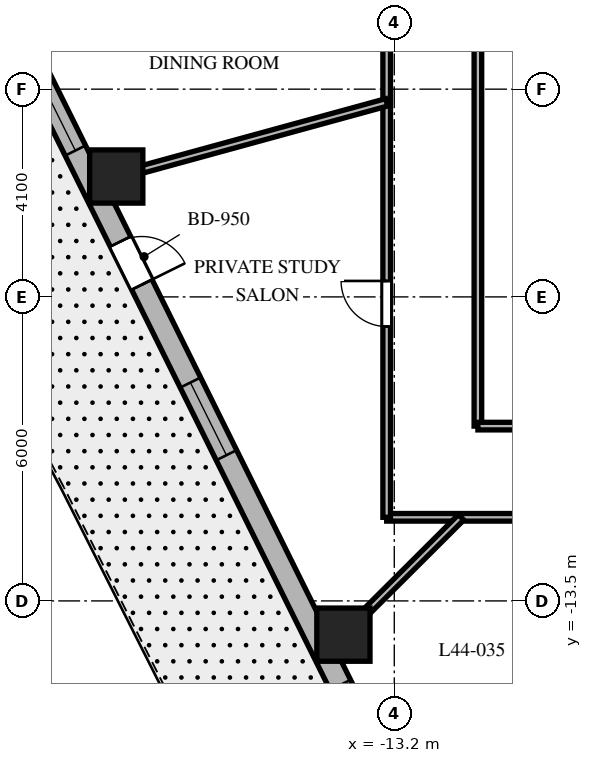
"""IFC4 building model, lengths in metres.
Left out: names, types, materials, properties, quantities, classifications, styles, units other than length and angle.
Written with IfcOpenShell. Run it as: python <this file> out.ifc"""

import sys

from ifc_helpers import new_model, si_unit, direction, frame, frame_2d, origin, origin_2d, place, context, subcontext, project, spatial, rectangle, extrude, element, fill, save


model = new_model("IFC4")
c1 = context("Model", 3, precision=1e-05, world=origin(), true_north=direction((0.0, 1.0)))
c2 = subcontext(c1, "Body", "Model", "MODEL_VIEW")
j1 = project(units=[si_unit("LENGTHUNIT", "METRE"), si_unit("PLANEANGLEUNIT", "RADIAN")], contexts=[c1])
p1 = place(None, origin())
s1 = spatial("IfcSite", under=j1, at=p1, CompositionType="ELEMENT")
p2 = place(p1, origin())
s2 = spatial("IfcBuilding", under=s1, at=p2, CompositionType="ELEMENT")
p3 = place(p2, frame((0.0, 0.0, 179.3)))
s3 = spatial("IfcBuildingStorey", under=s2, at=p3, CompositionType="ELEMENT", Elevation=179.3)
for number, where, z_axis, x_axis in (
    (1, (-18.687, -5.124, 0.0), (0.0, 0.0, 1.0), (1.0, 0.0, 0.0)),
    (2, (-14.204, -14.166, 0.0), (0.0, 0.0, 1.0), (1.0, 0.0, 0.0)),
):
    element("IfcColumn", number, at=place(p3, frame(where, z_axis=z_axis, x_axis=x_axis)), inside=s3, PredefinedType="COLUMN", context=c2, shape_type="SweptSolid", body=[
        extrude(rectangle(XDim=1.05, YDim=1.05, at=origin_2d()), origin(), (0.0, 0.0, 1.0), 3.7),
    ])
p4 = place(p3, frame((-20.618, -2.344, 0.0), z_axis=(0.0, 0.0, 1.0), x_axis=(0.444243691097, -0.895905990002, 0.0)))
e3 = element("IfcWall", 3, at=p4, inside=s3, PredefinedType="SOLIDWALL", context=c2, shape_type="SweptSolid", body=[
    extrude(rectangle(XDim=16.784, YDim=0.45, at=frame_2d((8.392, 0.0))), origin(), (0.0, 0.0, 1.0), 3.4),
])
p5 = place(p4, frame((4.535, 0.0, 0.0)))
e4 = element("IfcOpeningElement", 4, at=p5, cuts=e3, PredefinedType="OPENING", context=c2, shape_type="SweptSolid", body=[
    extrude(rectangle(XDim=0.95, YDim=2.15, at=frame_2d((0.475, 1.075))), frame((0.0, 0.235, 0.0), z_axis=(0.0, -1.0, 0.0), x_axis=(1.0, 0.0, 0.0)), (0.0, 0.0, 1.0), 0.47),
])
p6 = place(p4, frame((0.931, 0.0, 0.8)))
e5 = element("IfcOpeningElement", 5, at=p6, cuts=e3, PredefinedType="OPENING", context=c2, shape_type="SweptSolid", body=[
    extrude(rectangle(XDim=1.6, YDim=1.75, at=frame_2d((0.8, 0.875))), frame((0.0, 0.235, 0.0), z_axis=(0.0, -1.0, 0.0), x_axis=(1.0, 0.0, 0.0)), (0.0, 0.0, 1.0), 0.47),
])
p7 = place(p4, frame((7.642, 0.0, 0.8)))
e6 = element("IfcOpeningElement", 6, at=p7, cuts=e3, PredefinedType="OPENING", context=c2, shape_type="SweptSolid", body=[
    extrude(rectangle(XDim=1.6, YDim=1.75, at=frame_2d((0.8, 0.875))), frame((0.0, 0.235, 0.0), z_axis=(0.0, -1.0, 0.0), x_axis=(1.0, 0.0, 0.0)), (0.0, 0.0, 1.0), 0.47),
])
p8 = place(p4, frame((14.303, 0.0, 0.8)))
e7 = element("IfcOpeningElement", 7, at=p8, cuts=e3, PredefinedType="OPENING", context=c2, shape_type="SweptSolid", body=[
    extrude(rectangle(XDim=1.6, YDim=1.75, at=frame_2d((0.8, 0.875))), frame((0.0, 0.235, 0.0), z_axis=(0.0, -1.0, 0.0), x_axis=(1.0, 0.0, 0.0)), (0.0, 0.0, 1.0), 0.47),
])
p9 = place(p3, frame((13.35, -11.85, 0.0), z_axis=(0.0, 0.0, 1.0), x_axis=(-1.0, 0.0, 0.0)))
e8 = element("IfcWall", 8, at=p9, inside=s3, PredefinedType="PARTITIONING", context=c2, shape_type="SweptSolid", body=[
    extrude(rectangle(XDim=26.7, YDim=0.15, at=frame_2d((13.35, 0.0))), origin(), (0.0, 0.0, 1.0), 2.84),
])
p10 = place(p9, frame((22.7, 0.0, 0.0)))
e9 = element("IfcOpeningElement", 9, at=p10, cuts=e8, PredefinedType="OPENING", context=c2, shape_type="SweptSolid", body=[
    extrude(rectangle(XDim=0.9, YDim=2.03, at=frame_2d((0.45, 1.015))), frame((0.0, 0.085, 0.0), z_axis=(0.0, -1.0, 0.0), x_axis=(1.0, 0.0, 0.0)), (0.0, 0.0, 1.0), 0.17),
])
p11 = place(p9, frame((18.523, 0.0, 0.0)))
e10 = element("IfcOpeningElement", 10, at=p11, cuts=e8, PredefinedType="OPENING", context=c2, shape_type="SweptSolid", body=[
    extrude(rectangle(XDim=0.95, YDim=2.03, at=frame_2d((0.475, 1.015))), frame((0.0, 0.085, 0.0), z_axis=(0.0, -1.0, 0.0), x_axis=(1.0, 0.0, 0.0)), (0.0, 0.0, 1.0), 0.17),
])
p12 = place(p9, frame((14.469, 0.0, 0.0)))
e11 = element("IfcOpeningElement", 11, at=p12, cuts=e8, PredefinedType="OPENING", context=c2, shape_type="SweptSolid", body=[
    extrude(rectangle(XDim=0.95, YDim=2.03, at=frame_2d((0.475, 1.015))), frame((0.0, 0.085, 0.0), z_axis=(0.0, -1.0, 0.0), x_axis=(1.0, 0.0, 0.0)), (0.0, 0.0, 1.0), 0.17),
])
p13 = place(p9, frame((10.314, 0.0, 0.0)))
e12 = element("IfcOpeningElement", 12, at=p13, cuts=e8, PredefinedType="OPENING", context=c2, shape_type="SweptSolid", body=[
    extrude(rectangle(XDim=0.95, YDim=2.03, at=frame_2d((0.475, 1.015))), frame((0.0, 0.085, 0.0), z_axis=(0.0, -1.0, 0.0), x_axis=(1.0, 0.0, 0.0)), (0.0, 0.0, 1.0), 0.17),
])
p14 = place(p9, frame((3.995, 0.0, 0.0)))
e13 = element("IfcOpeningElement", 13, at=p14, cuts=e8, PredefinedType="OPENING", context=c2, shape_type="SweptSolid", body=[
    extrude(rectangle(XDim=0.95, YDim=2.03, at=frame_2d((0.475, 1.015))), frame((0.0, 0.085, 0.0), z_axis=(0.0, -1.0, 0.0), x_axis=(1.0, 0.0, 0.0)), (0.0, 0.0, 1.0), 0.17),
])
p15 = place(p3, frame((-13.35, -11.85, 0.0), z_axis=(0.0, 0.0, 1.0), x_axis=(0.0, 1.0, 0.0)))
e14 = element("IfcWall", 14, at=p15, inside=s3, PredefinedType="PARTITIONING", context=c2, shape_type="SweptSolid", body=[
    extrude(rectangle(XDim=23.7, YDim=0.15, at=frame_2d((11.85, 0.0))), origin(), (0.0, 0.0, 1.0), 2.84),
])
p16 = place(p15, frame((18.389, 0.0, 0.0)))
e15 = element("IfcOpeningElement", 15, at=p16, cuts=e14, PredefinedType="OPENING", context=c2, shape_type="SweptSolid", body=[
    extrude(rectangle(XDim=0.95, YDim=2.03, at=frame_2d((0.475, 1.015))), frame((0.0, 0.085, 0.0), z_axis=(0.0, -1.0, 0.0), x_axis=(1.0, 0.0, 0.0)), (0.0, 0.0, 1.0), 0.17),
])
p17 = place(p15, frame((12.315, 0.0, 0.0)))
e16 = element("IfcOpeningElement", 16, at=p17, cuts=e14, PredefinedType="OPENING", context=c2, shape_type="SweptSolid", body=[
    extrude(rectangle(XDim=0.9, YDim=2.03, at=frame_2d((0.45, 1.015))), frame((0.0, 0.085, 0.0), z_axis=(0.0, -1.0, 0.0), x_axis=(1.0, 0.0, 0.0)), (0.0, 0.0, 1.0), 0.17),
])
p18 = place(p15, frame((9.27, 0.0, 0.0)))
e17 = element("IfcOpeningElement", 17, at=p18, cuts=e14, PredefinedType="OPENING", context=c2, shape_type="SweptSolid", body=[
    extrude(rectangle(XDim=0.9, YDim=2.03, at=frame_2d((0.45, 1.015))), frame((0.0, 0.085, 0.0), z_axis=(0.0, -1.0, 0.0), x_axis=(1.0, 0.0, 0.0)), (0.0, 0.0, 1.0), 0.17),
])
p19 = place(p15, frame((3.765, 0.0, 0.0)))
e18 = element("IfcOpeningElement", 18, at=p19, cuts=e14, PredefinedType="OPENING", context=c2, shape_type="SweptSolid", body=[
    extrude(rectangle(XDim=0.9, YDim=2.03, at=frame_2d((0.45, 1.015))), frame((0.0, 0.085, 0.0), z_axis=(0.0, -1.0, 0.0), x_axis=(1.0, 0.0, 0.0)), (0.0, 0.0, 1.0), 0.17),
])
p20 = place(p3, frame((-11.55, 2.7, 0.0), z_axis=(0.0, 0.0, 1.0), x_axis=(0.0, -1.0, 0.0)))
e19 = element("IfcWall", 19, at=p20, inside=s3, PredefinedType="PARTITIONING", context=c2, shape_type="SweptSolid", body=[
    extrude(rectangle(XDim=12.75, YDim=0.15, at=frame_2d((6.375, 0.0))), origin(), (0.0, 0.0, 1.0), 2.84),
])
p21 = place(p3, frame((-11.55, -10.05, 0.0), z_axis=(0.0, 0.0, 1.0), x_axis=(1.0, 0.0, 0.0)))
e20 = element("IfcWall", 20, at=p21, inside=s3, PredefinedType="PARTITIONING", context=c2, shape_type="SweptSolid", body=[
    extrude(rectangle(XDim=11.55, YDim=0.15, at=frame_2d((5.775, 0.0))), origin(), (0.0, 0.0, 1.0), 2.84),
])
p22 = place(p3, frame((-13.35, -3.661, 0.0), z_axis=(0.0, 0.0, 1.0), x_axis=(-0.964397145454, -0.264458211898, 0.0)))
e21 = element("IfcWall", 21, at=p22, inside=s3, PredefinedType="PARTITIONING", context=c2, shape_type="SweptSolid", body=[
    extrude(rectangle(XDim=6.039, YDim=0.15, at=frame_2d((3.019, 0.0))), origin(), (0.0, 0.0, 1.0), 2.64),
])
p23 = place(p3, frame((-11.882, -11.85, 0.0), z_axis=(0.0, 0.0, 1.0), x_axis=(-0.708037373639, -0.706174962407, 0.0)))
e22 = element("IfcWall", 22, at=p23, inside=s3, PredefinedType="PARTITIONING", context=c2, shape_type="SweptSolid", body=[
    extrude(rectangle(XDim=3.802, YDim=0.15, at=frame_2d((1.901, 0.0))), origin(), (0.0, 0.0, 1.0), 2.64),
])
p24 = place(p3, frame((-7.619, -11.85, 0.0), z_axis=(0.0, 0.0, 1.0), x_axis=(-0.540829263478, -0.841132396098, 0.0)))
e23 = element("IfcWall", 23, at=p24, inside=s3, PredefinedType="PARTITIONING", context=c2, shape_type="SweptSolid", body=[
    extrude(rectangle(XDim=7.919, YDim=0.15, at=frame_2d((3.959, 0.0))), origin(), (0.0, 0.0, 1.0), 2.64),
])
p25 = place(p5, origin())
e24 = element("IfcDoor", 24, at=p25, inside=s3, OperationType="SINGLE_SWING_RIGHT", PredefinedType="DOOR", context=c2, shape_type="SweptSolid", body=[
    extrude(rectangle(XDim=0.95, YDim=2.15, at=frame_2d((0.475, 1.075))), frame((0.0, 0.025, 0.0), z_axis=(0.0, -1.0, 0.0), x_axis=(1.0, 0.0, 0.0)), (0.0, 0.0, 1.0), 0.05),
])
fill(e4, e24)
p26 = place(p6, origin())
e25 = element("IfcWindow", 25, at=p26, inside=s3, PartitioningType="SINGLE_PANEL", PredefinedType="WINDOW", context=c2, shape_type="SweptSolid", body=[
    extrude(rectangle(XDim=1.6, YDim=1.75, at=frame_2d((0.8, 0.875))), frame((0.0, 0.03, 0.0), z_axis=(0.0, -1.0, 0.0), x_axis=(1.0, 0.0, 0.0)), (0.0, 0.0, 1.0), 0.06),
])
fill(e5, e25)
p27 = place(p7, origin())
e26 = element("IfcWindow", 26, at=p27, inside=s3, PartitioningType="SINGLE_PANEL", PredefinedType="WINDOW", context=c2, shape_type="SweptSolid", body=[
    extrude(rectangle(XDim=1.6, YDim=1.75, at=frame_2d((0.8, 0.875))), frame((0.0, 0.03, 0.0), z_axis=(0.0, -1.0, 0.0), x_axis=(1.0, 0.0, 0.0)), (0.0, 0.0, 1.0), 0.06),
])
fill(e6, e26)
p28 = place(p19, origin())
e27 = element("IfcDoor", 27, at=p28, inside=s3, OperationType="SINGLE_SWING_RIGHT", PredefinedType="DOOR", context=c2, shape_type="SweptSolid", body=[
    extrude(rectangle(XDim=0.9, YDim=2.03, at=frame_2d((0.45, 1.015))), frame((0.0, 0.025, 0.0), z_axis=(0.0, -1.0, 0.0), x_axis=(1.0, 0.0, 0.0)), (0.0, 0.0, 1.0), 0.05),
])
fill(e18, e27)
save(model, sys.argv[1])
